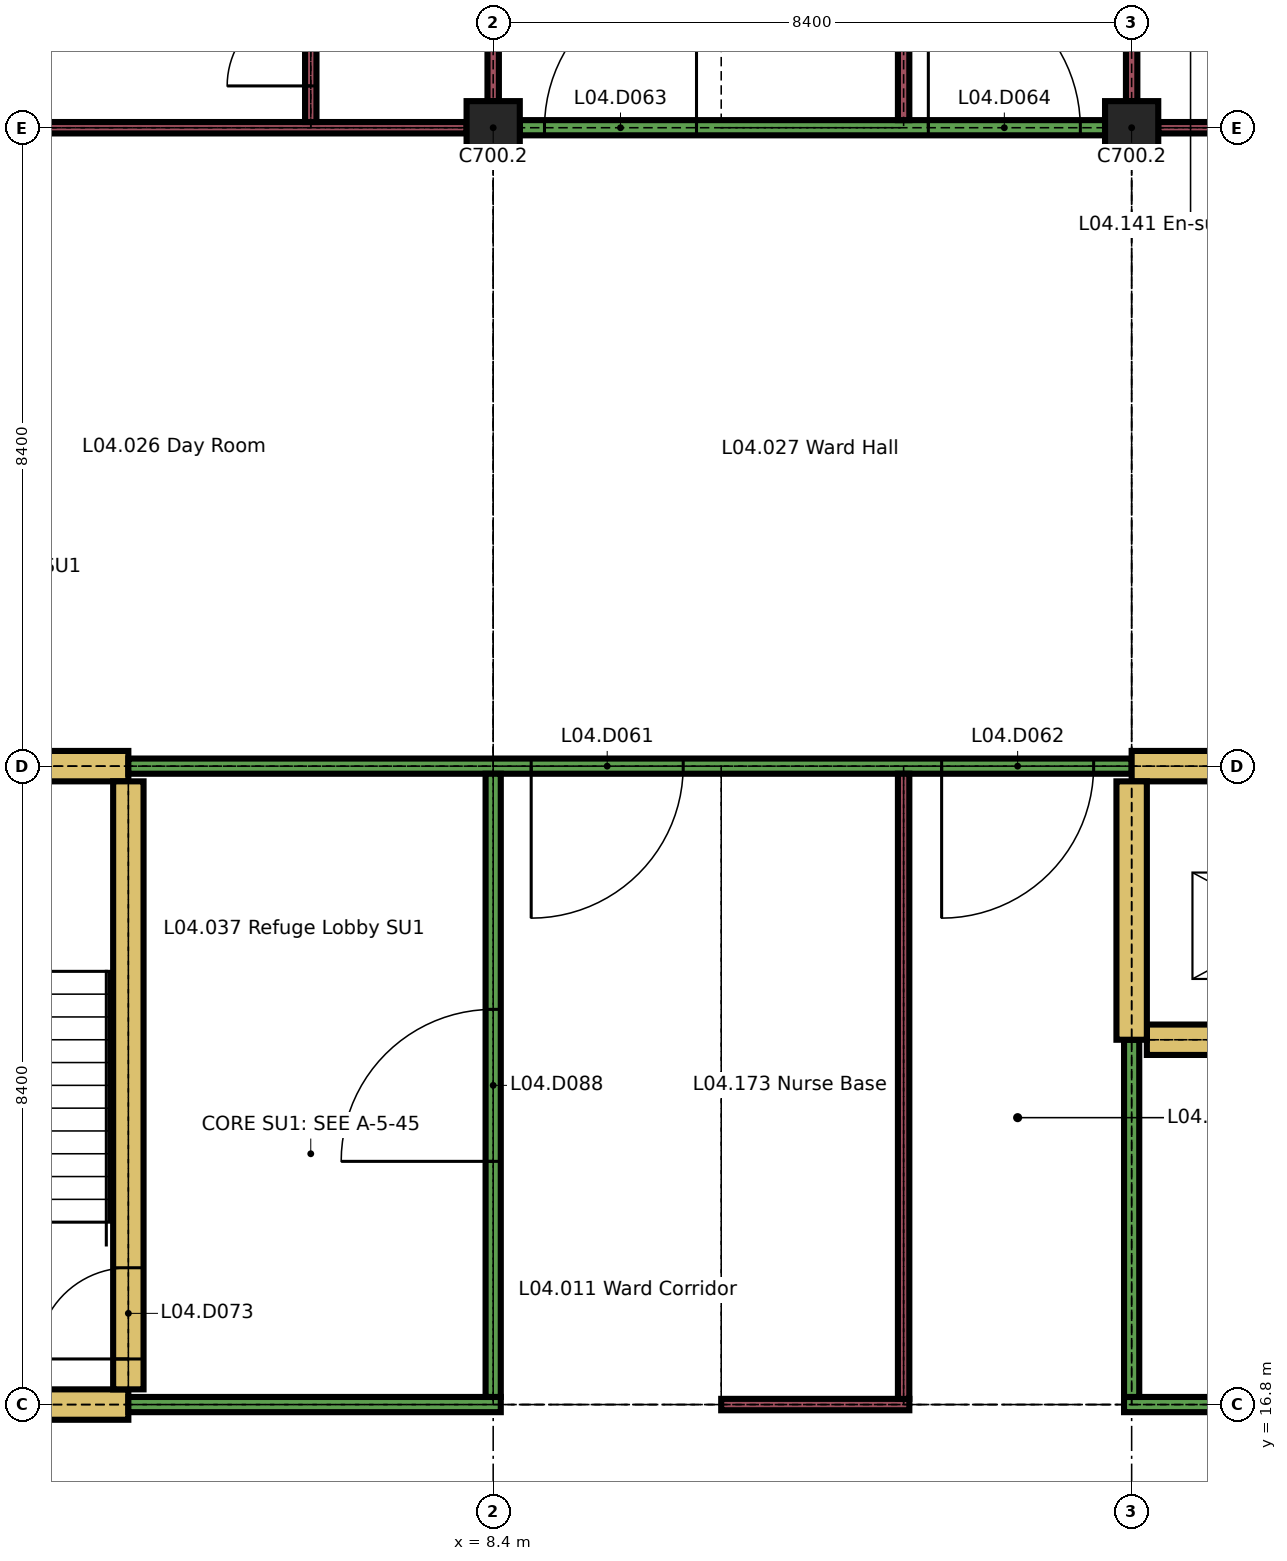
"""IFC4 building model, lengths in metres.
Left out: names, types, materials, properties, quantities, classifications, styles, units other than length and angle.
Written with IfcOpenShell. Run it as: python <this file> out.ifc"""

import sys

from ifc_helpers import new_model, si_unit, direction, frame, frame_2d, origin, origin_2d, place, context, subcontext, project, spatial, rectangle, extrude, element, fill, save


model = new_model("IFC4")
c1 = context("Model", 3, precision=1e-05, world=origin(), true_north=direction((0.0, 1.0)))
c2 = subcontext(c1, "Body", "Model", "MODEL_VIEW")
j1 = project(units=[si_unit("LENGTHUNIT", "METRE"), si_unit("PLANEANGLEUNIT", "RADIAN")], contexts=[c1])
p1 = place(None, origin())
s1 = spatial("IfcSite", under=j1, at=p1, CompositionType="ELEMENT")
p2 = place(p1, origin())
s2 = spatial("IfcBuilding", under=s1, at=p2, CompositionType="ELEMENT")
p3 = place(p2, frame((0.0, 0.0, 18.9)))
s3 = spatial("IfcBuildingStorey", under=s2, at=p3, CompositionType="ELEMENT", Elevation=18.9)
for number, where, z_axis, x_axis in (
    (1, (8.4, 33.6, 0.0), (0.0, 0.0, 1.0), (1.0, 0.0, 0.0)),
    (2, (16.8, 33.6, 0.0), (0.0, 0.0, 1.0), (1.0, 0.0, 0.0)),
):
    element("IfcColumn", number, at=place(p3, frame(where, z_axis=z_axis, x_axis=x_axis)), inside=s3, PredefinedType="COLUMN", context=c2, shape_type="SweptSolid", body=[
        extrude(rectangle(XDim=0.7, YDim=0.7, at=origin_2d()), origin(), (0.0, 0.0, 1.0), 3.26),
    ])
p4 = place(p3, frame((0.15, 16.8, 0.0), z_axis=(0.0, 0.0, 1.0), x_axis=(1.0, 0.0, 0.0)))
e3 = element("IfcWall", 3, at=p4, inside=s3, PredefinedType="SHEAR", context=c2, shape_type="SweptSolid", body=[
    extrude(rectangle(XDim=3.45, YDim=0.4, at=frame_2d((1.725, 0.0))), origin(), (0.0, 0.0, 1.0), 3.26),
])
p5 = place(p3, frame((3.6, 16.8, 0.0), z_axis=(0.0, 0.0, 1.0), x_axis=(1.0, 0.0, 0.0)))
e4 = element("IfcWall", 4, at=p5, inside=s3, PredefinedType="PARTITIONING", context=c2, shape_type="SweptSolid", body=[
    extrude(rectangle(XDim=4.9, YDim=0.2, at=frame_2d((2.45, 0.0))), origin(), (0.0, 0.0, 1.0), 3.26),
])
p6 = place(p3, frame((11.4, 16.8, 0.0), z_axis=(0.0, 0.0, 1.0), x_axis=(1.0, 0.0, 0.0)))
e5 = element("IfcWall", 5, at=p6, inside=s3, PredefinedType="PARTITIONING", context=c2, shape_type="SweptSolid", body=[
    extrude(rectangle(XDim=2.475, YDim=0.15, at=frame_2d((1.238, 0.0))), origin(), (0.0, 0.0, 1.0), 3.26),
])
p7 = place(p3, frame((16.7, 16.8, 0.0), z_axis=(0.0, 0.0, 1.0), x_axis=(1.0, 0.0, 0.0)))
e6 = element("IfcWall", 6, at=p7, inside=s3, PredefinedType="PARTITIONING", context=c2, shape_type="SweptSolid", body=[
    extrude(rectangle(XDim=8.4, YDim=0.2, at=frame_2d((4.2, 0.0))), origin(), (0.0, 0.0, 1.0), 3.26),
])
p8 = place(p7, frame((3.25, 0.0, 0.0)))
e7 = element("IfcOpeningElement", 7, at=p8, cuts=e6, PredefinedType="OPENING", context=c2, shape_type="SweptSolid", body=[
    extrude(rectangle(XDim=2.0, YDim=2.4, at=frame_2d((1.0, 1.2))), frame((0.0, 0.11, 0.0), z_axis=(0.0, -1.0, 0.0), x_axis=(1.0, 0.0, 0.0)), (0.0, 0.0, 1.0), 0.22),
])
p9 = place(p3, frame((17.0, 21.6, 0.0), z_axis=(0.0, 0.0, 1.0), x_axis=(1.0, 0.0, 0.0)))
e8 = element("IfcWall", 8, at=p9, inside=s3, PredefinedType="SHEAR", context=c2, shape_type="SweptSolid", body=[
    extrude(rectangle(XDim=8.0, YDim=0.4, at=frame_2d((4.0, 0.0))), origin(), (0.0, 0.0, 1.0), 3.26),
])
p10 = place(p9, frame((1.35, 0.0, 0.0)))
e9 = element("IfcOpeningElement", 9, at=p10, cuts=e8, PredefinedType="OPENING", context=c2, shape_type="SweptSolid", body=[
    extrude(rectangle(XDim=1.3, YDim=2.1, at=frame_2d((0.65, 1.05))), frame((0.0, 0.21, 0.0), z_axis=(0.0, -1.0, 0.0), x_axis=(1.0, 0.0, 0.0)), (0.0, 0.0, 1.0), 0.42),
])
p11 = place(p9, frame((5.45, 0.0, 0.0)))
e10 = element("IfcOpeningElement", 10, at=p11, cuts=e8, PredefinedType="OPENING", context=c2, shape_type="SweptSolid", body=[
    extrude(rectangle(XDim=1.1, YDim=2.1, at=frame_2d((0.55, 1.05))), frame((0.0, 0.21, 0.0), z_axis=(0.0, -1.0, 0.0), x_axis=(1.0, 0.0, 0.0)), (0.0, 0.0, 1.0), 0.42),
])
p12 = place(p3, frame((0.15, 25.2, 0.0), z_axis=(0.0, 0.0, 1.0), x_axis=(1.0, 0.0, 0.0)))
e11 = element("IfcWall", 11, at=p12, inside=s3, PredefinedType="SHEAR", context=c2, shape_type="SweptSolid", body=[
    extrude(rectangle(XDim=3.45, YDim=0.4, at=frame_2d((1.725, 0.0))), origin(), (0.0, 0.0, 1.0), 3.26),
])
p13 = place(p3, frame((3.6, 25.2, 0.0), z_axis=(0.0, 0.0, 1.0), x_axis=(1.0, 0.0, 0.0)))
e12 = element("IfcWall", 12, at=p13, inside=s3, PredefinedType="PARTITIONING", context=c2, shape_type="SweptSolid", body=[
    extrude(rectangle(XDim=13.2, YDim=0.2, at=frame_2d((6.6, 0.0))), origin(), (0.0, 0.0, 1.0), 3.26),
])
p14 = place(p13, frame((5.3, 0.0, 0.0)))
e13 = element("IfcOpeningElement", 13, at=p14, cuts=e12, PredefinedType="OPENING", context=c2, shape_type="SweptSolid", body=[
    extrude(rectangle(XDim=2.0, YDim=2.4, at=frame_2d((1.0, 1.2))), frame((0.0, 0.11, 0.0), z_axis=(0.0, -1.0, 0.0), x_axis=(1.0, 0.0, 0.0)), (0.0, 0.0, 1.0), 0.22),
])
p15 = place(p13, frame((10.7, 0.0, 0.0)))
e14 = element("IfcOpeningElement", 14, at=p15, cuts=e12, PredefinedType="OPENING", context=c2, shape_type="SweptSolid", body=[
    extrude(rectangle(XDim=2.0, YDim=2.4, at=frame_2d((1.0, 1.2))), frame((0.0, 0.11, 0.0), z_axis=(0.0, -1.0, 0.0), x_axis=(1.0, 0.0, 0.0)), (0.0, 0.0, 1.0), 0.22),
])
p16 = place(p3, frame((16.8, 25.2, 0.0), z_axis=(0.0, 0.0, 1.0), x_axis=(1.0, 0.0, 0.0)))
e15 = element("IfcWall", 15, at=p16, inside=s3, PredefinedType="SHEAR", context=c2, shape_type="SweptSolid", body=[
    extrude(rectangle(XDim=8.4, YDim=0.4, at=frame_2d((4.2, 0.0))), origin(), (0.0, 0.0, 1.0), 3.26),
])
p17 = place(p3, frame((0.35, 33.6, 0.0), z_axis=(0.0, 0.0, 1.0), x_axis=(1.0, 0.0, 0.0)))
e16 = element("IfcWall", 16, at=p17, inside=s3, PredefinedType="PARTITIONING", context=c2, shape_type="SweptSolid", body=[
    extrude(rectangle(XDim=7.7, YDim=0.15, at=frame_2d((3.85, 0.0))), origin(), (0.0, 0.0, 1.0), 3.26),
])
p18 = place(p3, frame((8.75, 33.6, 0.0), z_axis=(0.0, 0.0, 1.0), x_axis=(1.0, 0.0, 0.0)))
e17 = element("IfcWall", 17, at=p18, inside=s3, PredefinedType="PARTITIONING", context=c2, shape_type="SweptSolid", body=[
    extrude(rectangle(XDim=7.7, YDim=0.2, at=frame_2d((3.85, 0.0))), origin(), (0.0, 0.0, 1.0), 3.26),
])
p19 = place(p18, frame((0.325, 0.0, 0.0)))
e18 = element("IfcOpeningElement", 18, at=p19, cuts=e17, PredefinedType="OPENING", context=c2, shape_type="SweptSolid", body=[
    extrude(rectangle(XDim=2.0, YDim=2.4, at=frame_2d((1.0, 1.2))), frame((0.0, 0.11, 0.0), z_axis=(0.0, -1.0, 0.0), x_axis=(1.0, 0.0, 0.0)), (0.0, 0.0, 1.0), 0.22),
])
p20 = place(p18, frame((5.375, 0.0, 0.0)))
e19 = element("IfcOpeningElement", 19, at=p20, cuts=e17, PredefinedType="OPENING", context=c2, shape_type="SweptSolid", body=[
    extrude(rectangle(XDim=2.0, YDim=2.4, at=frame_2d((1.0, 1.2))), frame((0.0, 0.11, 0.0), z_axis=(0.0, -1.0, 0.0), x_axis=(1.0, 0.0, 0.0)), (0.0, 0.0, 1.0), 0.22),
])
p21 = place(p3, frame((17.15, 33.6, 0.0), z_axis=(0.0, 0.0, 1.0), x_axis=(1.0, 0.0, 0.0)))
e20 = element("IfcWall", 20, at=p21, inside=s3, PredefinedType="PARTITIONING", context=c2, shape_type="SweptSolid", body=[
    extrude(rectangle(XDim=7.7, YDim=0.15, at=frame_2d((3.85, 0.0))), origin(), (0.0, 0.0, 1.0), 3.26),
])
p22 = place(p3, frame((3.6, 17.0, 0.0), z_axis=(0.0, 0.0, 1.0), x_axis=(0.0, 1.0, 0.0)))
e21 = element("IfcWall", 21, at=p22, inside=s3, PredefinedType="SHEAR", context=c2, shape_type="SweptSolid", body=[
    extrude(rectangle(XDim=8.0, YDim=0.4, at=frame_2d((4.0, 0.0))), origin(), (0.0, 0.0, 1.0), 3.26),
])
p23 = place(p22, frame((0.4, 0.0, 0.0)))
e22 = element("IfcOpeningElement", 22, at=p23, cuts=e21, PredefinedType="OPENING", context=c2, shape_type="SweptSolid", body=[
    extrude(rectangle(XDim=1.2, YDim=2.1, at=frame_2d((0.6, 1.05))), frame((0.0, 0.21, 0.0), z_axis=(0.0, -1.0, 0.0), x_axis=(1.0, 0.0, 0.0)), (0.0, 0.0, 1.0), 0.42),
])
p24 = place(p3, frame((6.0, 33.675, 0.0), z_axis=(0.0, 0.0, 1.0), x_axis=(0.0, 1.0, 0.0)))
e23 = element("IfcWall", 23, at=p24, inside=s3, PredefinedType="PARTITIONING", context=c2, shape_type="SweptSolid", body=[
    extrude(rectangle(XDim=2.05, YDim=0.15, at=frame_2d((1.025, 0.0))), origin(), (0.0, 0.0, 1.0), 3.26),
])
p25 = place(p24, frame((0.475, 0.0, 0.0)))
e24 = element("IfcOpeningElement", 24, at=p25, cuts=e23, PredefinedType="OPENING", context=c2, shape_type="SweptSolid", body=[
    extrude(rectangle(XDim=1.1, YDim=2.1, at=frame_2d((0.55, 1.05))), frame((0.0, 0.085, 0.0), z_axis=(0.0, -1.0, 0.0), x_axis=(1.0, 0.0, 0.0)), (0.0, 0.0, 1.0), 0.17),
])
p26 = place(p3, frame((8.4, 16.9, 0.0), z_axis=(0.0, 0.0, 1.0), x_axis=(0.0, 1.0, 0.0)))
e25 = element("IfcWall", 25, at=p26, inside=s3, PredefinedType="PARTITIONING", context=c2, shape_type="SweptSolid", body=[
    extrude(rectangle(XDim=8.2, YDim=0.2, at=frame_2d((4.1, 0.0))), origin(), (0.0, 0.0, 1.0), 3.26),
])
p27 = place(p26, frame((3.1, 0.0, 0.0)))
e26 = element("IfcOpeningElement", 26, at=p27, cuts=e25, PredefinedType="OPENING", context=c2, shape_type="SweptSolid", body=[
    extrude(rectangle(XDim=2.0, YDim=2.4, at=frame_2d((1.0, 1.2))), frame((0.0, 0.11, 0.0), z_axis=(0.0, -1.0, 0.0), x_axis=(1.0, 0.0, 0.0)), (0.0, 0.0, 1.0), 0.22),
])
p28 = place(p3, frame((8.4, 33.95, 0.0), z_axis=(0.0, 0.0, 1.0), x_axis=(0.0, 1.0, 0.0)))
e27 = element("IfcWall", 27, at=p28, inside=s3, PredefinedType="PARTITIONING", context=c2, shape_type="SweptSolid", body=[
    extrude(rectangle(XDim=7.7, YDim=0.15, at=frame_2d((3.85, 0.0))), origin(), (0.0, 0.0, 1.0), 3.26),
])
p29 = place(p28, frame((2.1, 0.0, 0.0)))
e28 = element("IfcOpeningElement", 28, at=p29, cuts=e27, PredefinedType="OPENING", context=c2, shape_type="SweptSolid", body=[
    extrude(rectangle(XDim=1.5, YDim=2.4, at=frame_2d((0.75, 1.2))), frame((0.0, 0.085, 0.0), z_axis=(0.0, -1.0, 0.0), x_axis=(1.0, 0.0, 0.0)), (0.0, 0.0, 1.0), 0.17),
])
p30 = place(p28, frame((4.1, 0.0, 0.0)))
e29 = element("IfcOpeningElement", 29, at=p30, cuts=e27, PredefinedType="OPENING", context=c2, shape_type="SweptSolid", body=[
    extrude(rectangle(XDim=1.5, YDim=2.4, at=frame_2d((0.75, 1.2))), frame((0.0, 0.085, 0.0), z_axis=(0.0, -1.0, 0.0), x_axis=(1.0, 0.0, 0.0)), (0.0, 0.0, 1.0), 0.17),
])
p31 = place(p3, frame((13.8, 16.875, 0.0), z_axis=(0.0, 0.0, 1.0), x_axis=(0.0, 1.0, 0.0)))
e30 = element("IfcWall", 30, at=p31, inside=s3, PredefinedType="PARTITIONING", context=c2, shape_type="SweptSolid", body=[
    extrude(rectangle(XDim=8.225, YDim=0.15, at=frame_2d((4.113, 0.0))), origin(), (0.0, 0.0, 1.0), 3.26),
])
p32 = place(p3, frame((13.8, 33.7, 0.0), z_axis=(0.0, 0.0, 1.0), x_axis=(0.0, 1.0, 0.0)))
e31 = element("IfcWall", 31, at=p32, inside=s3, PredefinedType="PARTITIONING", context=c2, shape_type="SweptSolid", body=[
    extrude(rectangle(XDim=58.6, YDim=0.15, at=frame_2d((29.3, 0.0))), origin(), (0.0, 0.0, 1.0), 3.26),
])
p33 = place(p32, frame((12.6, 0.0, 0.0)))
e32 = element("IfcOpeningElement", 32, at=p33, cuts=e31, PredefinedType="OPENING", context=c2, shape_type="SweptSolid", body=[
    extrude(rectangle(XDim=1.2, YDim=2.1, at=frame_2d((0.6, 1.05))), frame((0.0, 0.085, 0.0), z_axis=(0.0, -1.0, 0.0), x_axis=(1.0, 0.0, 0.0)), (0.0, 0.0, 1.0), 0.17),
])
p34 = place(p32, frame((39.2, 0.0, 0.0)))
e33 = element("IfcOpeningElement", 33, at=p34, cuts=e31, PredefinedType="OPENING", context=c2, shape_type="SweptSolid", body=[
    extrude(rectangle(XDim=1.2, YDim=2.1, at=frame_2d((0.6, 1.05))), frame((0.0, 0.085, 0.0), z_axis=(0.0, -1.0, 0.0), x_axis=(1.0, 0.0, 0.0)), (0.0, 0.0, 1.0), 0.17),
])
p35 = place(p3, frame((16.8, 16.9, 0.0), z_axis=(0.0, 0.0, 1.0), x_axis=(0.0, 1.0, 0.0)))
e34 = element("IfcWall", 34, at=p35, inside=s3, PredefinedType="PARTITIONING", context=c2, shape_type="SweptSolid", body=[
    extrude(rectangle(XDim=4.7, YDim=0.2, at=frame_2d((2.35, 0.0))), origin(), (0.0, 0.0, 1.0), 3.26),
])
p36 = place(p3, frame((16.8, 21.6, 0.0), z_axis=(0.0, 0.0, 1.0), x_axis=(0.0, 1.0, 0.0)))
e35 = element("IfcWall", 35, at=p36, inside=s3, PredefinedType="SHEAR", context=c2, shape_type="SweptSolid", body=[
    extrude(rectangle(XDim=3.4, YDim=0.4, at=frame_2d((1.7, 0.0))), origin(), (0.0, 0.0, 1.0), 3.26),
])
p37 = place(p3, frame((16.8, 33.95, 0.0), z_axis=(0.0, 0.0, 1.0), x_axis=(0.0, 1.0, 0.0)))
e36 = element("IfcWall", 36, at=p37, inside=s3, PredefinedType="PARTITIONING", context=c2, shape_type="SweptSolid", body=[
    extrude(rectangle(XDim=8.05, YDim=0.15, at=frame_2d((4.025, 0.0))), origin(), (0.0, 0.0, 1.0), 3.26),
])
p38 = place(p37, frame((2.35, 0.0, 0.0)))
e37 = element("IfcOpeningElement", 37, at=p38, cuts=e36, PredefinedType="OPENING", context=c2, shape_type="SweptSolid", body=[
    extrude(rectangle(XDim=1.2, YDim=2.1, at=frame_2d((0.6, 1.05))), frame((0.0, 0.085, 0.0), z_axis=(0.0, -1.0, 0.0), x_axis=(1.0, 0.0, 0.0)), (0.0, 0.0, 1.0), 0.17),
])
p39 = place(p37, frame((4.1, 0.0, 0.0)))
e38 = element("IfcOpeningElement", 38, at=p39, cuts=e36, PredefinedType="OPENING", context=c2, shape_type="SweptSolid", body=[
    extrude(rectangle(XDim=1.5, YDim=2.4, at=frame_2d((0.75, 1.2))), frame((0.0, 0.085, 0.0), z_axis=(0.0, -1.0, 0.0), x_axis=(1.0, 0.0, 0.0)), (0.0, 0.0, 1.0), 0.17),
])
p40 = place(p14, origin())
e39 = element("IfcDoor", 39, at=p40, inside=s3, OperationType="SINGLE_SWING_LEFT", PredefinedType="DOOR", context=c2, shape_type="SweptSolid", body=[
    extrude(rectangle(XDim=2.0, YDim=2.4, at=frame_2d((1.0, 1.2))), frame((0.0, 0.03, 0.0), z_axis=(0.0, -1.0, 0.0), x_axis=(1.0, 0.0, 0.0)), (0.0, 0.0, 1.0), 0.06),
])
fill(e13, e39)
p41 = place(p15, origin())
e40 = element("IfcDoor", 40, at=p41, inside=s3, OperationType="SINGLE_SWING_LEFT", PredefinedType="DOOR", context=c2, shape_type="SweptSolid", body=[
    extrude(rectangle(XDim=2.0, YDim=2.4, at=frame_2d((1.0, 1.2))), frame((0.0, 0.03, 0.0), z_axis=(0.0, -1.0, 0.0), x_axis=(1.0, 0.0, 0.0)), (0.0, 0.0, 1.0), 0.06),
])
fill(e14, e40)
p42 = place(p19, origin())
e41 = element("IfcDoor", 41, at=p42, inside=s3, OperationType="SINGLE_SWING_LEFT", PredefinedType="DOOR", context=c2, shape_type="SweptSolid", body=[
    extrude(rectangle(XDim=2.0, YDim=2.4, at=frame_2d((1.0, 1.2))), frame((0.0, 0.03, 0.0), z_axis=(0.0, -1.0, 0.0), x_axis=(1.0, 0.0, 0.0)), (0.0, 0.0, 1.0), 0.06),
])
fill(e18, e41)
p43 = place(p20, origin())
e42 = element("IfcDoor", 42, at=p43, inside=s3, OperationType="SINGLE_SWING_RIGHT", PredefinedType="DOOR", context=c2, shape_type="SweptSolid", body=[
    extrude(rectangle(XDim=2.0, YDim=2.4, at=frame_2d((1.0, 1.2))), frame((0.0, 0.03, 0.0), z_axis=(0.0, -1.0, 0.0), x_axis=(1.0, 0.0, 0.0)), (0.0, 0.0, 1.0), 0.06),
])
fill(e19, e42)
p44 = place(p23, origin())
e43 = element("IfcDoor", 43, at=p44, inside=s3, OperationType="SINGLE_SWING_RIGHT", PredefinedType="DOOR", context=c2, shape_type="SweptSolid", body=[
    extrude(rectangle(XDim=1.2, YDim=2.1, at=frame_2d((0.6, 1.05))), frame((0.0, 0.025, 0.0), z_axis=(0.0, -1.0, 0.0), x_axis=(1.0, 0.0, 0.0)), (0.0, 0.0, 1.0), 0.05),
])
fill(e22, e43)
p45 = place(p25, origin())
e44 = element("IfcDoor", 44, at=p45, inside=s3, OperationType="SINGLE_SWING_RIGHT", PredefinedType="DOOR", context=c2, shape_type="SweptSolid", body=[
    extrude(rectangle(XDim=1.1, YDim=2.1, at=frame_2d((0.55, 1.05))), frame((0.0, 0.025, 0.0), z_axis=(0.0, -1.0, 0.0), x_axis=(1.0, 0.0, 0.0)), (0.0, 0.0, 1.0), 0.05),
])
fill(e24, e44)
p46 = place(p27, origin())
e45 = element("IfcDoor", 45, at=p46, inside=s3, OperationType="SINGLE_SWING_RIGHT", PredefinedType="DOOR", context=c2, shape_type="SweptSolid", body=[
    extrude(rectangle(XDim=2.0, YDim=2.4, at=frame_2d((1.0, 1.2))), frame((0.0, 0.03, 0.0), z_axis=(0.0, -1.0, 0.0), x_axis=(1.0, 0.0, 0.0)), (0.0, 0.0, 1.0), 0.06),
])
fill(e26, e45)
save(model, sys.argv[1])
